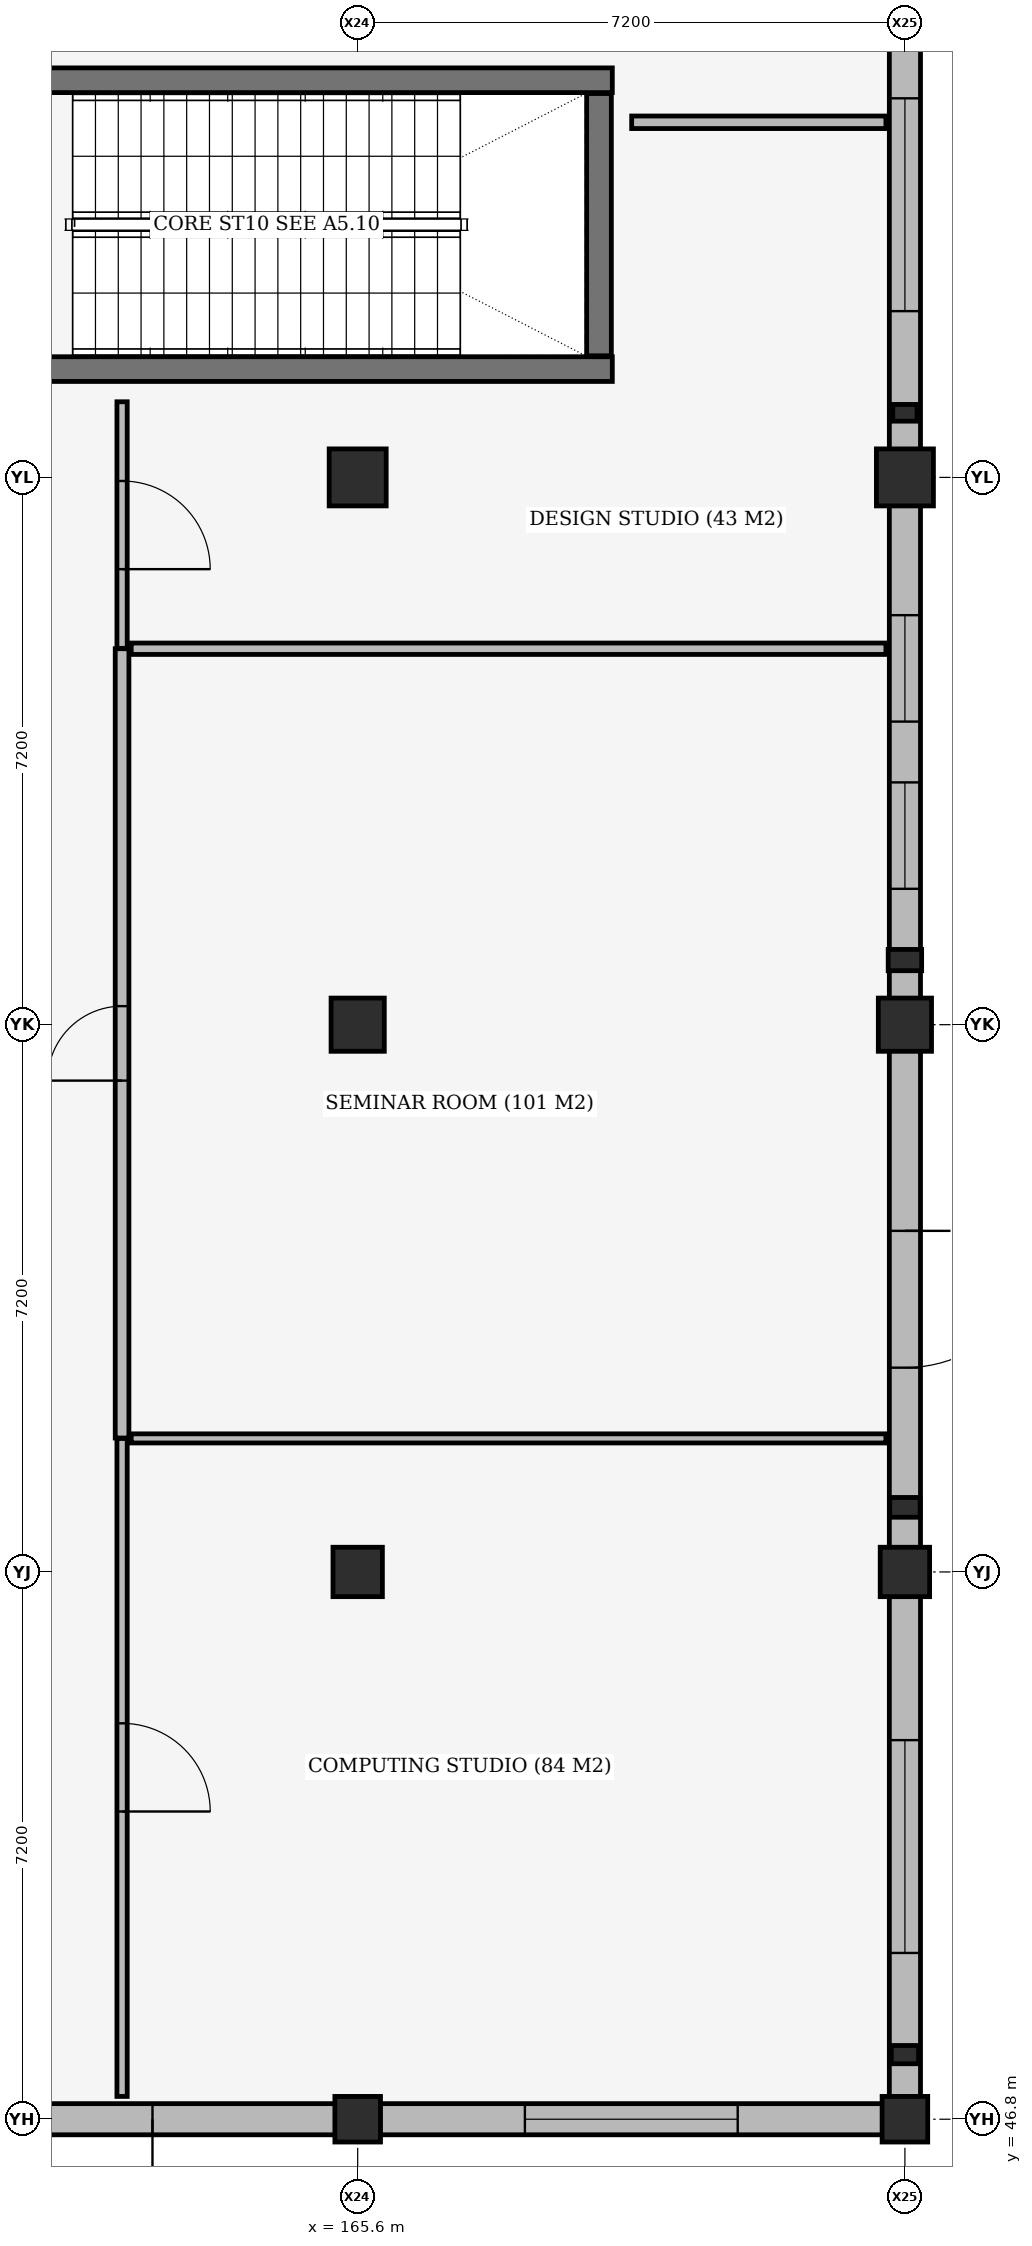
"""IFC4 building model, lengths in metres.
Left out: names, types, materials, properties, quantities, classifications, styles, units other than length and angle.
Written with IfcOpenShell. Run it as: python <this file> out.ifc"""

import sys

from ifc_helpers import new_model, si_unit, direction, frame, frame_2d, origin, origin_2d, place, context, subcontext, project, spatial, rectangle, extrude, element, fill, save


model = new_model("IFC4")
c1 = context("Model", 3, precision=1e-05, world=origin(), true_north=direction((0.0, 1.0)))
c2 = subcontext(c1, "Body", "Model", "MODEL_VIEW")
j1 = project(units=[si_unit("LENGTHUNIT", "METRE"), si_unit("PLANEANGLEUNIT", "RADIAN")], contexts=[c1])
p1 = place(None, origin())
s1 = spatial("IfcSite", under=j1, at=p1, CompositionType="ELEMENT")
p2 = place(p1, origin())
s2 = spatial("IfcBuilding", under=s1, at=p2, CompositionType="ELEMENT")
p3 = place(p2, origin())
s3 = spatial("IfcBuildingStorey", under=s2, at=p3, CompositionType="ELEMENT", Elevation=0.0)
p4 = place(p3, frame((165.6, 46.8, 0.0), z_axis=(0.0, 0.0, 1.0), x_axis=(1.0, 0.0, 0.0)))
e1 = element("IfcColumn", 1, at=p4, inside=s3, PredefinedType="COLUMN", context=c2, shape_type="SweptSolid", body=[
    extrude(rectangle(XDim=0.6, YDim=0.6, at=origin_2d()), origin(), (0.0, 0.0, 1.0), 5.1),
])
p5 = place(p3, frame((165.6, 54.0, 0.0), z_axis=(0.0, 0.0, 1.0), x_axis=(1.0, 0.0, 0.0)))
e2 = element("IfcColumn", 2, at=p5, inside=s3, PredefinedType="COLUMN", context=c2, shape_type="SweptSolid", body=[
    extrude(rectangle(XDim=0.65, YDim=0.65, at=origin_2d()), origin(), (0.0, 0.0, 1.0), 5.1),
])
p6 = place(p3, frame((165.6, 61.2, 0.0), z_axis=(0.0, 0.0, 1.0), x_axis=(1.0, 0.0, 0.0)))
e3 = element("IfcColumn", 3, at=p6, inside=s3, PredefinedType="COLUMN", context=c2, shape_type="SweptSolid", body=[
    extrude(rectangle(XDim=0.7, YDim=0.7, at=origin_2d()), origin(), (0.0, 0.0, 1.0), 5.1),
])
p7 = place(p3, frame((165.6, 68.4, 0.0), z_axis=(0.0, 0.0, 1.0), x_axis=(1.0, 0.0, 0.0)))
e4 = element("IfcColumn", 4, at=p7, inside=s3, PredefinedType="COLUMN", context=c2, shape_type="SweptSolid", body=[
    extrude(rectangle(XDim=0.75, YDim=0.75, at=origin_2d()), origin(), (0.0, 0.0, 1.0), 5.1),
])
p8 = place(p3, frame((172.8, 46.8, 0.0), z_axis=(0.0, 0.0, 1.0), x_axis=(1.0, 0.0, 0.0)))
e5 = element("IfcColumn", 5, at=p8, inside=s3, PredefinedType="COLUMN", context=c2, shape_type="SweptSolid", body=[
    extrude(rectangle(XDim=0.6, YDim=0.6, at=origin_2d()), origin(), (0.0, 0.0, 1.0), 5.1),
])
p9 = place(p3, frame((172.8, 54.0, 0.0), z_axis=(0.0, 0.0, 1.0), x_axis=(1.0, 0.0, 0.0)))
e6 = element("IfcColumn", 6, at=p9, inside=s3, PredefinedType="COLUMN", context=c2, shape_type="SweptSolid", body=[
    extrude(rectangle(XDim=0.65, YDim=0.65, at=origin_2d()), origin(), (0.0, 0.0, 1.0), 5.1),
])
p10 = place(p3, frame((172.8, 61.2, 0.0), z_axis=(0.0, 0.0, 1.0), x_axis=(1.0, 0.0, 0.0)))
e7 = element("IfcColumn", 7, at=p10, inside=s3, PredefinedType="COLUMN", context=c2, shape_type="SweptSolid", body=[
    extrude(rectangle(XDim=0.7, YDim=0.7, at=origin_2d()), origin(), (0.0, 0.0, 1.0), 5.1),
])
p11 = place(p3, frame((172.8, 68.4, 0.0), z_axis=(0.0, 0.0, 1.0), x_axis=(1.0, 0.0, 0.0)))
e8 = element("IfcColumn", 8, at=p11, inside=s3, PredefinedType="COLUMN", context=c2, shape_type="SweptSolid", body=[
    extrude(rectangle(XDim=0.75, YDim=0.75, at=origin_2d()), origin(), (0.0, 0.0, 1.0), 5.1),
])
p12 = place(p3, frame((172.8, 47.65, 0.0), z_axis=(0.0, 0.0, 1.0), x_axis=(1.0, 0.0, 0.0)))
e9 = element("IfcColumn", 9, at=p12, inside=s3, PredefinedType="PILASTER", context=c2, shape_type="SweptSolid", body=[
    extrude(rectangle(XDim=0.36, YDim=0.24, at=origin_2d()), origin(), (0.0, 0.0, 1.0), 5.1),
])
p13 = place(p3, frame((172.8, 54.85, 0.0), z_axis=(0.0, 0.0, 1.0), x_axis=(1.0, 0.0, 0.0)))
e10 = element("IfcColumn", 10, at=p13, inside=s3, PredefinedType="PILASTER", context=c2, shape_type="SweptSolid", body=[
    extrude(rectangle(XDim=0.4, YDim=0.26, at=origin_2d()), origin(), (0.0, 0.0, 1.0), 5.1),
])
p14 = place(p3, frame((172.8, 62.05, 0.0), z_axis=(0.0, 0.0, 1.0), x_axis=(1.0, 0.0, 0.0)))
e11 = element("IfcColumn", 11, at=p14, inside=s3, PredefinedType="PILASTER", context=c2, shape_type="SweptSolid", body=[
    extrude(rectangle(XDim=0.44, YDim=0.28, at=origin_2d()), origin(), (0.0, 0.0, 1.0), 5.1),
])
p15 = place(p3, frame((172.8, 69.25, 0.0), z_axis=(0.0, 0.0, 1.0), x_axis=(1.0, 0.0, 0.0)))
e12 = element("IfcColumn", 12, at=p15, inside=s3, PredefinedType="PILASTER", context=c2, shape_type="SweptSolid", body=[
    extrude(rectangle(XDim=0.32, YDim=0.22, at=origin_2d()), origin(), (0.0, 0.0, 1.0), 5.1),
])
for number, where, z_axis, x_axis in (
    (13, (159.85, 69.825, 0.0), (0.0, 0.0, 1.0), (1.0, 0.0, 0.0)),
    (14, (168.95, 73.625, 0.0), (0.0, 0.0, 1.0), (-1.0, 0.0, 0.0)),
):
    element("IfcWall", number, at=place(p3, frame(where, z_axis=z_axis, x_axis=x_axis)), inside=s3, PredefinedType="SHEAR", context=c2, shape_type="SweptSolid", body=[
        extrude(rectangle(XDim=9.1, YDim=0.325, at=frame_2d((4.55, 0.0))), origin(), (0.0, 0.0, 1.0), 5.1),
    ])
p16 = place(p3, frame((168.775, 70.0, 0.0), z_axis=(0.0, 0.0, 1.0), x_axis=(0.0, 1.0, 0.0)))
e15 = element("IfcWall", 15, at=p16, inside=s3, PredefinedType="SHEAR", context=c2, shape_type="SweptSolid", body=[
    extrude(rectangle(XDim=3.45, YDim=0.325, at=frame_2d((1.725, 0.0))), origin(), (0.0, 0.0, 1.0), 5.1),
])
p17 = place(p3, frame((165.308, 46.8, 0.0), z_axis=(0.0, 0.0, 1.0), x_axis=(-1.0, 0.0, 0.0)))
e16 = element("IfcWall", 16, at=p17, inside=s3, PredefinedType="STANDARD", context=c2, shape_type="SweptSolid", body=[
    extrude(rectangle(XDim=6.616, YDim=0.41, at=frame_2d((3.308, 0.0))), origin(), (0.0, 0.0, 1.0), 4.45),
])
p18 = place(p17, frame((2.408, 0.0, 0.0)))
e17 = element("IfcOpeningElement", 17, at=p18, cuts=e16, PredefinedType="OPENING", context=c2, shape_type="SweptSolid", body=[
    extrude(rectangle(XDim=1.8, YDim=2.2, at=frame_2d((0.9, 1.1))), frame((0.0, 0.215, 0.0), z_axis=(0.0, -1.0, 0.0), x_axis=(1.0, 0.0, 0.0)), (0.0, 0.0, 1.0), 0.43),
])
p19 = place(p3, frame((172.508, 46.8, 0.0), z_axis=(0.0, 0.0, 1.0), x_axis=(-1.0, 0.0, 0.0)))
e18 = element("IfcWall", 18, at=p19, inside=s3, PredefinedType="STANDARD", context=c2, shape_type="SweptSolid", body=[
    extrude(rectangle(XDim=6.616, YDim=0.41, at=frame_2d((3.308, 0.0))), origin(), (0.0, 0.0, 1.0), 4.4),
])
p20 = place(p19, frame((1.908, 0.0, 0.85)))
e19 = element("IfcOpeningElement", 19, at=p20, cuts=e18, PredefinedType="OPENING", context=c2, shape_type="SweptSolid", body=[
    extrude(rectangle(XDim=2.8, YDim=2.4, at=frame_2d((1.4, 1.2))), frame((0.0, 0.215, 0.0), z_axis=(0.0, -1.0, 0.0), x_axis=(1.0, 0.0, 0.0)), (0.0, 0.0, 1.0), 0.43),
])
p21 = place(p3, frame((172.8, 53.683, 0.0), z_axis=(0.0, 0.0, 1.0), x_axis=(0.0, -1.0, 0.0)))
e20 = element("IfcWall", 20, at=p21, inside=s3, PredefinedType="STANDARD", context=c2, shape_type="SweptSolid", body=[
    extrude(rectangle(XDim=6.591, YDim=0.41, at=frame_2d((3.295, 0.0))), origin(), (0.0, 0.0, 1.0), 4.5),
])
p22 = place(p21, frame((1.896, 0.0, 0.85)))
e21 = element("IfcOpeningElement", 21, at=p22, cuts=e20, PredefinedType="OPENING", context=c2, shape_type="SweptSolid", body=[
    extrude(rectangle(XDim=2.8, YDim=2.4, at=frame_2d((1.4, 1.2))), frame((0.0, 0.215, 0.0), z_axis=(0.0, -1.0, 0.0), x_axis=(1.0, 0.0, 0.0)), (0.0, 0.0, 1.0), 0.43),
])
p23 = place(p3, frame((172.8, 60.858, 0.0), z_axis=(0.0, 0.0, 1.0), x_axis=(0.0, -1.0, 0.0)))
e22 = element("IfcWall", 22, at=p23, inside=s3, PredefinedType="STANDARD", context=c2, shape_type="SweptSolid", body=[
    extrude(rectangle(XDim=6.541, YDim=0.41, at=frame_2d((3.271, 0.0))), origin(), (0.0, 0.0, 1.0), 4.45),
])
p24 = place(p23, frame((2.371, 0.0, 0.0)))
e23 = element("IfcOpeningElement", 23, at=p24, cuts=e22, PredefinedType="OPENING", context=c2, shape_type="SweptSolid", body=[
    extrude(rectangle(XDim=1.8, YDim=2.2, at=frame_2d((0.9, 1.1))), frame((0.0, 0.215, 0.0), z_axis=(0.0, -1.0, 0.0), x_axis=(1.0, 0.0, 0.0)), (0.0, 0.0, 1.0), 0.43),
])
p25 = place(p3, frame((172.8, 68.033, 0.0), z_axis=(0.0, 0.0, 1.0), x_axis=(0.0, -1.0, 0.0)))
e24 = element("IfcWall", 24, at=p25, inside=s3, PredefinedType="STANDARD", context=c2, shape_type="SweptSolid", body=[
    extrude(rectangle(XDim=6.491, YDim=0.41, at=frame_2d((3.246, 0.0))), origin(), (0.0, 0.0, 1.0), 4.4),
])
p26 = place(p25, frame((1.446, 0.0, 0.85)))
e25 = element("IfcOpeningElement", 25, at=p26, cuts=e24, PredefinedType="OPENING", context=c2, shape_type="SweptSolid", body=[
    extrude(rectangle(XDim=1.4, YDim=2.6, at=frame_2d((0.7, 1.3))), frame((0.0, 0.215, 0.0), z_axis=(0.0, -1.0, 0.0), x_axis=(1.0, 0.0, 0.0)), (0.0, 0.0, 1.0), 0.43),
])
p27 = place(p25, frame((3.646, 0.0, 0.85)))
e26 = element("IfcOpeningElement", 26, at=p27, cuts=e24, PredefinedType="OPENING", context=c2, shape_type="SweptSolid", body=[
    extrude(rectangle(XDim=1.4, YDim=2.6, at=frame_2d((0.7, 1.3))), frame((0.0, 0.215, 0.0), z_axis=(0.0, -1.0, 0.0), x_axis=(1.0, 0.0, 0.0)), (0.0, 0.0, 1.0), 0.43),
])
p28 = place(p3, frame((172.8, 75.208, 0.0), z_axis=(0.0, 0.0, 1.0), x_axis=(0.0, -1.0, 0.0)))
e27 = element("IfcWall", 27, at=p28, inside=s3, PredefinedType="STANDARD", context=c2, shape_type="SweptSolid", body=[
    extrude(rectangle(XDim=6.441, YDim=0.41, at=frame_2d((3.22, 0.0))), origin(), (0.0, 0.0, 1.0), 4.35),
])
p29 = place(p28, frame((1.821, 0.0, 0.85)))
e28 = element("IfcOpeningElement", 28, at=p29, cuts=e27, PredefinedType="OPENING", context=c2, shape_type="SweptSolid", body=[
    extrude(rectangle(XDim=2.8, YDim=2.4, at=frame_2d((1.4, 1.2))), frame((0.0, 0.215, 0.0), z_axis=(0.0, -1.0, 0.0), x_axis=(1.0, 0.0, 0.0)), (0.0, 0.0, 1.0), 0.43),
])
p30 = place(p3, frame((162.5, 47.1, 0.0), z_axis=(0.0, 0.0, 1.0), x_axis=(0.0, 1.0, 0.0)))
e29 = element("IfcWall", 29, at=p30, inside=s3, PredefinedType="PARTITIONING", context=c2, shape_type="SweptSolid", body=[
    extrude(rectangle(XDim=8.657, YDim=0.135, at=frame_2d((4.329, 0.0))), origin(), (0.0, 0.0, 1.0), 4.35),
])
p31 = place(p30, frame((3.749, 0.0, 0.0)))
e30 = element("IfcOpeningElement", 30, at=p31, cuts=e29, PredefinedType="OPENING", context=c2, shape_type="SweptSolid", body=[
    extrude(rectangle(XDim=1.16, YDim=2.2, at=frame_2d((0.58, 1.1))), frame((0.0, 0.077, 0.0), z_axis=(0.0, -1.0, 0.0), x_axis=(1.0, 0.0, 0.0)), (0.0, 0.0, 1.0), 0.155),
])
p32 = place(p3, frame((162.62, 55.757, 0.0), z_axis=(0.0, 0.0, 1.0), x_axis=(1.0, 0.0, 0.0)))
e31 = element("IfcWall", 31, at=p32, inside=s3, PredefinedType="PARTITIONING", context=c2, shape_type="SweptSolid", body=[
    extrude(rectangle(XDim=9.93, YDim=0.12, at=frame_2d((4.965, 0.0))), origin(), (0.0, 0.0, 1.0), 4.35),
])
p33 = place(p3, frame((162.5, 55.762, 0.0), z_axis=(0.0, 0.0, 1.0), x_axis=(0.0, 1.0, 0.0)))
e32 = element("IfcWall", 32, at=p33, inside=s3, PredefinedType="PARTITIONING", context=c2, shape_type="SweptSolid", body=[
    extrude(rectangle(XDim=10.384, YDim=0.18, at=frame_2d((5.192, 0.0))), origin(), (0.0, 0.0, 1.0), 4.5),
])
p34 = place(p33, frame((4.702, 0.0, 0.0)))
e33 = element("IfcOpeningElement", 33, at=p34, cuts=e32, PredefinedType="OPENING", context=c2, shape_type="SweptSolid", body=[
    extrude(rectangle(XDim=0.98, YDim=2.18, at=frame_2d((0.49, 1.09))), frame((0.0, 0.1, 0.0), z_axis=(0.0, -1.0, 0.0), x_axis=(1.0, 0.0, 0.0)), (0.0, 0.0, 1.0), 0.2),
])
p35 = place(p3, frame((162.62, 66.146, 0.0), z_axis=(0.0, 0.0, 1.0), x_axis=(1.0, 0.0, 0.0)))
e34 = element("IfcWall", 34, at=p35, inside=s3, PredefinedType="PARTITIONING", context=c2, shape_type="SweptSolid", body=[
    extrude(rectangle(XDim=9.93, YDim=0.15, at=frame_2d((4.965, 0.0))), origin(), (0.0, 0.0, 1.0), 4.3),
])
p36 = place(p3, frame((162.5, 66.151, 0.0), z_axis=(0.0, 0.0, 1.0), x_axis=(0.0, 1.0, 0.0)))
e35 = element("IfcWall", 35, at=p36, inside=s3, PredefinedType="PARTITIONING", context=c2, shape_type="SweptSolid", body=[
    extrude(rectangle(XDim=3.244, YDim=0.135, at=frame_2d((1.622, 0.0))), origin(), (0.0, 0.0, 1.0), 4.3),
])
p37 = place(p36, frame((1.042, 0.0, 0.0)))
e36 = element("IfcOpeningElement", 36, at=p37, cuts=e35, PredefinedType="OPENING", context=c2, shape_type="SweptSolid", body=[
    extrude(rectangle(XDim=1.16, YDim=2.2, at=frame_2d((0.58, 1.1))), frame((0.0, 0.077, 0.0), z_axis=(0.0, -1.0, 0.0), x_axis=(1.0, 0.0, 0.0)), (0.0, 0.0, 1.0), 0.155),
])
p38 = place(p3, frame((169.205, 73.072, 0.0), z_axis=(0.0, 0.0, 1.0), x_axis=(1.0, 0.0, 0.0)))
e37 = element("IfcWall", 37, at=p38, inside=s3, PredefinedType="PARTITIONING", context=c2, shape_type="SweptSolid", body=[
    extrude(rectangle(XDim=3.345, YDim=0.165, at=frame_2d((1.672, 0.0))), origin(), (0.0, 0.0, 1.0), 4.65),
])
p39 = place(p18, origin())
e38 = element("IfcDoor", 38, at=p39, inside=s3, OperationType="DOUBLE_DOOR_SINGLE_SWING", PredefinedType="DOOR", context=c2, shape_type="SweptSolid", body=[
    extrude(rectangle(XDim=1.8, YDim=2.2, at=frame_2d((0.9, 1.1))), frame((0.0, 0.025, 0.0), z_axis=(0.0, -1.0, 0.0), x_axis=(1.0, 0.0, 0.0)), (0.0, 0.0, 1.0), 0.05),
])
fill(e17, e38)
p40 = place(p20, origin())
e39 = element("IfcWindow", 39, at=p40, inside=s3, PartitioningType="DOUBLE_PANEL_VERTICAL", PredefinedType="WINDOW", context=c2, shape_type="SweptSolid", body=[
    extrude(rectangle(XDim=2.8, YDim=2.4, at=frame_2d((1.4, 1.2))), frame((0.0, 0.03, 0.0), z_axis=(0.0, -1.0, 0.0), x_axis=(1.0, 0.0, 0.0)), (0.0, 0.0, 1.0), 0.06),
])
fill(e19, e39)
p41 = place(p22, origin())
e40 = element("IfcWindow", 40, at=p41, inside=s3, PartitioningType="DOUBLE_PANEL_VERTICAL", PredefinedType="WINDOW", context=c2, shape_type="SweptSolid", body=[
    extrude(rectangle(XDim=2.8, YDim=2.4, at=frame_2d((1.4, 1.2))), frame((0.0, 0.03, 0.0), z_axis=(0.0, -1.0, 0.0), x_axis=(1.0, 0.0, 0.0)), (0.0, 0.0, 1.0), 0.06),
])
fill(e21, e40)
p42 = place(p24, origin())
e41 = element("IfcDoor", 41, at=p42, inside=s3, OperationType="DOUBLE_DOOR_SINGLE_SWING", PredefinedType="DOOR", context=c2, shape_type="SweptSolid", body=[
    extrude(rectangle(XDim=1.8, YDim=2.2, at=frame_2d((0.9, 1.1))), frame((0.0, 0.025, 0.0), z_axis=(0.0, -1.0, 0.0), x_axis=(1.0, 0.0, 0.0)), (0.0, 0.0, 1.0), 0.05),
])
fill(e23, e41)
p43 = place(p26, origin())
e42 = element("IfcWindow", 42, at=p43, inside=s3, PartitioningType="DOUBLE_PANEL_VERTICAL", PredefinedType="WINDOW", context=c2, shape_type="SweptSolid", body=[
    extrude(rectangle(XDim=1.4, YDim=2.6, at=frame_2d((0.7, 1.3))), frame((0.0, 0.03, 0.0), z_axis=(0.0, -1.0, 0.0), x_axis=(1.0, 0.0, 0.0)), (0.0, 0.0, 1.0), 0.06),
])
fill(e25, e42)
p44 = place(p27, origin())
e43 = element("IfcWindow", 43, at=p44, inside=s3, PartitioningType="DOUBLE_PANEL_VERTICAL", PredefinedType="WINDOW", context=c2, shape_type="SweptSolid", body=[
    extrude(rectangle(XDim=1.4, YDim=2.6, at=frame_2d((0.7, 1.3))), frame((0.0, 0.03, 0.0), z_axis=(0.0, -1.0, 0.0), x_axis=(1.0, 0.0, 0.0)), (0.0, 0.0, 1.0), 0.06),
])
fill(e26, e43)
p45 = place(p29, origin())
e44 = element("IfcWindow", 44, at=p45, inside=s3, PartitioningType="DOUBLE_PANEL_VERTICAL", PredefinedType="WINDOW", context=c2, shape_type="SweptSolid", body=[
    extrude(rectangle(XDim=2.8, YDim=2.4, at=frame_2d((1.4, 1.2))), frame((0.0, 0.03, 0.0), z_axis=(0.0, -1.0, 0.0), x_axis=(1.0, 0.0, 0.0)), (0.0, 0.0, 1.0), 0.06),
])
fill(e28, e44)
p46 = place(p31, origin())
e45 = element("IfcDoor", 45, at=p46, inside=s3, OperationType="SINGLE_SWING_RIGHT", PredefinedType="DOOR", context=c2, shape_type="SweptSolid", body=[
    extrude(rectangle(XDim=1.16, YDim=2.2, at=frame_2d((0.58, 1.1))), frame((0.0, 0.025, 0.0), z_axis=(0.0, -1.0, 0.0), x_axis=(1.0, 0.0, 0.0)), (0.0, 0.0, 1.0), 0.05),
])
fill(e30, e45)
p47 = place(p34, origin())
e46 = element("IfcDoor", 46, at=p47, inside=s3, OperationType="SINGLE_SWING_LEFT", PredefinedType="DOOR", context=c2, shape_type="SweptSolid", body=[
    extrude(rectangle(XDim=0.98, YDim=2.18, at=frame_2d((0.49, 1.09))), frame((0.0, 0.025, 0.0), z_axis=(0.0, -1.0, 0.0), x_axis=(1.0, 0.0, 0.0)), (0.0, 0.0, 1.0), 0.05),
])
fill(e33, e46)
p48 = place(p37, origin())
e47 = element("IfcDoor", 47, at=p48, inside=s3, OperationType="SINGLE_SWING_RIGHT", PredefinedType="DOOR", context=c2, shape_type="SweptSolid", body=[
    extrude(rectangle(XDim=1.16, YDim=2.2, at=frame_2d((0.58, 1.1))), frame((0.0, 0.025, 0.0), z_axis=(0.0, -1.0, 0.0), x_axis=(1.0, 0.0, 0.0)), (0.0, 0.0, 1.0), 0.05),
])
fill(e36, e47)
save(model, sys.argv[1])
